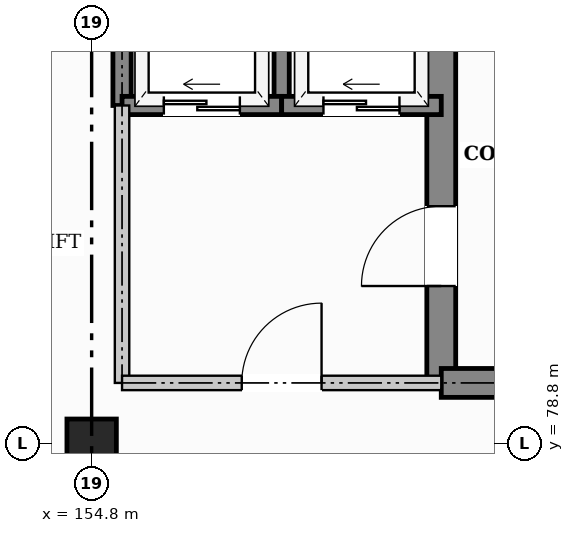
"""IFC4 building model, lengths in metres.
Left out: names, types, materials, properties, quantities, classifications, styles, units other than length and angle.
Written with IfcOpenShell. Run it as: python <this file> out.ifc"""

import sys

from ifc_helpers import new_model, si_unit, direction, frame, frame_2d, origin, origin_2d, place, context, subcontext, project, spatial, rectangle, extrude, element, fill, save


model = new_model("IFC4")
c1 = context("Model", 3, precision=1e-05, world=origin(), true_north=direction((0.0, 1.0)))
c2 = subcontext(c1, "Body", "Model", "MODEL_VIEW")
j1 = project(units=[si_unit("LENGTHUNIT", "METRE"), si_unit("PLANEANGLEUNIT", "RADIAN")], contexts=[c1])
p1 = place(None, origin())
s1 = spatial("IfcSite", under=j1, at=p1, CompositionType="ELEMENT")
p2 = place(p1, origin())
s2 = spatial("IfcBuilding", under=s1, at=p2, CompositionType="ELEMENT")
p3 = place(p2, frame((0.0, 0.0, 20.4)))
s3 = spatial("IfcBuildingStorey", under=s2, at=p3, CompositionType="ELEMENT", Elevation=20.4)
p4 = place(p3, frame((154.8, 78.8, 0.0), z_axis=(0.0, 0.0, 1.0), x_axis=(1.0, 0.0, 0.0)))
e1 = element("IfcColumn", 1, at=p4, inside=s3, PredefinedType="COLUMN", context=c2, shape_type="SweptSolid", body=[
    extrude(rectangle(XDim=0.65, YDim=0.65, at=origin_2d()), origin(), (0.0, 0.0, 1.0), 3.6),
])
p5 = place(p3, frame((159.4, 79.6, 0.0), z_axis=(0.0, 0.0, 1.0), x_axis=(0.0, 1.0, 0.0)))
e2 = element("IfcWall", 2, at=p5, inside=s3, PredefinedType="SHEAR", context=c2, shape_type="SweptSolid", body=[
    extrude(rectangle(XDim=6.0, YDim=0.38, at=frame_2d((3.0, 0.0))), origin(), (0.0, 0.0, 1.0), 3.34),
])
p6 = place(p5, frame((1.275, 0.0, 0.0)))
e3 = element("IfcOpeningElement", 3, at=p6, cuts=e2, PredefinedType="OPENING", context=c2, shape_type="SweptSolid", body=[
    extrude(rectangle(XDim=1.05, YDim=2.15, at=frame_2d((0.525, 1.075))), frame((0.0, 0.2, 0.0), z_axis=(0.0, -1.0, 0.0), x_axis=(1.0, 0.0, 0.0)), (0.0, 0.0, 1.0), 0.4),
])
p7 = place(p3, frame((159.4, 79.6, 0.0), z_axis=(0.0, 0.0, 1.0), x_axis=(1.0, 0.0, 0.0)))
e4 = element("IfcWall", 4, at=p7, inside=s3, PredefinedType="SHEAR", context=c2, shape_type="SweptSolid", body=[
    extrude(rectangle(XDim=7.0, YDim=0.38, at=frame_2d((3.5, 0.0))), origin(), (0.0, 0.0, 1.0), 3.34),
])
p8 = place(p3, frame((155.2, 83.25, 0.0), z_axis=(0.0, 0.0, 1.0), x_axis=(0.0, 1.0, 0.0)))
e5 = element("IfcWall", 5, at=p8, inside=s3, PredefinedType="SHEAR", context=c2, shape_type="SweptSolid", body=[
    extrude(rectangle(XDim=2.35, YDim=0.24, at=frame_2d((1.175, 0.0))), origin(), (0.0, 0.0, 1.0), 3.34),
])
p9 = place(p3, frame((157.3, 83.25, 0.0), z_axis=(0.0, 0.0, 1.0), x_axis=(0.0, 1.0, 0.0)))
e6 = element("IfcWall", 6, at=p9, inside=s3, PredefinedType="SHEAR", context=c2, shape_type="SweptSolid", body=[
    extrude(rectangle(XDim=2.35, YDim=0.2, at=frame_2d((1.175, 0.0))), origin(), (0.0, 0.0, 1.0), 3.34),
])
p10 = place(p3, frame((155.2, 83.25, 0.0), z_axis=(0.0, 0.0, 1.0), x_axis=(1.0, 0.0, 0.0)))
e7 = element("IfcWall", 7, at=p10, inside=s3, PredefinedType="SHEAR", context=c2, shape_type="SweptSolid", body=[
    extrude(rectangle(XDim=2.1, YDim=0.24, at=frame_2d((1.05, 0.0))), origin(), (0.0, 0.0, 1.0), 3.34),
])
p11 = place(p10, frame((0.55, 0.0, 0.0)))
e8 = element("IfcOpeningElement", 8, at=p11, cuts=e7, PredefinedType="OPENING", context=c2, shape_type="SweptSolid", body=[
    extrude(rectangle(XDim=1.0, YDim=2.1, at=frame_2d((0.5, 1.05))), frame((0.0, 0.13, 0.0), z_axis=(0.0, -1.0, 0.0), x_axis=(1.0, 0.0, 0.0)), (0.0, 0.0, 1.0), 0.26),
])
p12 = place(p3, frame((157.3, 83.25, 0.0), z_axis=(0.0, 0.0, 1.0), x_axis=(1.0, 0.0, 0.0)))
e9 = element("IfcWall", 9, at=p12, inside=s3, PredefinedType="SHEAR", context=c2, shape_type="SweptSolid", body=[
    extrude(rectangle(XDim=2.1, YDim=0.24, at=frame_2d((1.05, 0.0))), origin(), (0.0, 0.0, 1.0), 3.34),
])
p13 = place(p12, frame((0.55, 0.0, 0.0)))
e10 = element("IfcOpeningElement", 10, at=p13, cuts=e9, PredefinedType="OPENING", context=c2, shape_type="SweptSolid", body=[
    extrude(rectangle(XDim=1.0, YDim=2.1, at=frame_2d((0.5, 1.05))), frame((0.0, 0.13, 0.0), z_axis=(0.0, -1.0, 0.0), x_axis=(1.0, 0.0, 0.0)), (0.0, 0.0, 1.0), 0.26),
])
p14 = place(p3, frame((155.2, 79.6, 0.0), z_axis=(0.0, 0.0, 1.0), x_axis=(0.0, 1.0, 0.0)))
e11 = element("IfcWall", 11, at=p14, inside=s3, PredefinedType="PARTITIONING", context=c2, shape_type="SweptSolid", body=[
    extrude(rectangle(XDim=3.65, YDim=0.19, at=frame_2d((1.825, 0.0))), origin(), (0.0, 0.0, 1.0), 3.34),
])
p15 = place(p3, frame((155.2, 79.6, 0.0), z_axis=(0.0, 0.0, 1.0), x_axis=(1.0, 0.0, 0.0)))
e12 = element("IfcWall", 12, at=p15, inside=s3, PredefinedType="PARTITIONING", context=c2, shape_type="SweptSolid", body=[
    extrude(rectangle(XDim=4.2, YDim=0.19, at=frame_2d((2.1, 0.0))), origin(), (0.0, 0.0, 1.0), 3.34),
])
p16 = place(p15, frame((1.575, 0.0, 0.0)))
e13 = element("IfcOpeningElement", 13, at=p16, cuts=e12, PredefinedType="OPENING", context=c2, shape_type="SweptSolid", body=[
    extrude(rectangle(XDim=1.05, YDim=2.15, at=frame_2d((0.525, 1.075))), frame((0.0, 0.105, 0.0), z_axis=(0.0, -1.0, 0.0), x_axis=(1.0, 0.0, 0.0)), (0.0, 0.0, 1.0), 0.21),
])
p17 = place(p6, origin())
e14 = element("IfcDoor", 14, at=p17, inside=s3, OperationType="SINGLE_SWING_LEFT", PredefinedType="DOOR", context=c2, shape_type="SweptSolid", body=[
    extrude(rectangle(XDim=1.05, YDim=2.15, at=frame_2d((0.525, 1.075))), frame((0.0, 0.025, 0.0), z_axis=(0.0, -1.0, 0.0), x_axis=(1.0, 0.0, 0.0)), (0.0, 0.0, 1.0), 0.05),
])
fill(e3, e14)
p18 = place(p11, origin())
e15 = element("IfcDoor", 15, at=p18, inside=s3, OperationType="SLIDING_TO_LEFT", PredefinedType="DOOR", context=c2, shape_type="SweptSolid", body=[
    extrude(rectangle(XDim=1.0, YDim=2.1, at=frame_2d((0.5, 1.05))), frame((0.0, 0.025, 0.0), z_axis=(0.0, -1.0, 0.0), x_axis=(1.0, 0.0, 0.0)), (0.0, 0.0, 1.0), 0.05),
])
fill(e8, e15)
p19 = place(p13, origin())
e16 = element("IfcDoor", 16, at=p19, inside=s3, OperationType="SLIDING_TO_LEFT", PredefinedType="DOOR", context=c2, shape_type="SweptSolid", body=[
    extrude(rectangle(XDim=1.0, YDim=2.1, at=frame_2d((0.5, 1.05))), frame((0.0, 0.025, 0.0), z_axis=(0.0, -1.0, 0.0), x_axis=(1.0, 0.0, 0.0)), (0.0, 0.0, 1.0), 0.05),
])
fill(e10, e16)
p20 = place(p16, origin())
e17 = element("IfcDoor", 17, at=p20, inside=s3, OperationType="SINGLE_SWING_RIGHT", PredefinedType="DOOR", context=c2, shape_type="SweptSolid", body=[
    extrude(rectangle(XDim=1.05, YDim=2.15, at=frame_2d((0.525, 1.075))), frame((0.0, 0.025, 0.0), z_axis=(0.0, -1.0, 0.0), x_axis=(1.0, 0.0, 0.0)), (0.0, 0.0, 1.0), 0.05),
])
fill(e13, e17)
save(model, sys.argv[1])
